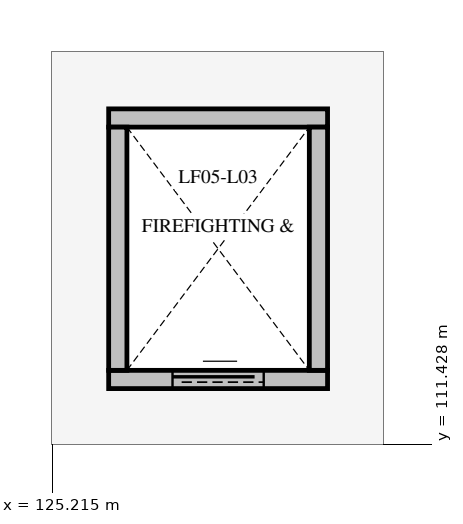
"""IFC4 building model, lengths in metres.
Left out: names, types, materials, properties, quantities, classifications, styles, units other than length and angle.
Written with IfcOpenShell. Run it as: python <this file> out.ifc"""

import sys

from ifc_helpers import new_model, si_unit, direction, frame, frame_2d, origin, place, context, subcontext, project, spatial, rectangle, extrude, element, fill, save


model = new_model("IFC4")
c1 = context("Model", 3, precision=1e-05, world=origin(), true_north=direction((0.0, 1.0)))
c2 = subcontext(c1, "Body", "Model", "MODEL_VIEW")
j1 = project(units=[si_unit("LENGTHUNIT", "METRE"), si_unit("PLANEANGLEUNIT", "RADIAN")], contexts=[c1])
p1 = place(None, origin())
s1 = spatial("IfcSite", under=j1, at=p1, CompositionType="ELEMENT")
p2 = place(p1, origin())
s2 = spatial("IfcBuilding", under=s1, at=p2, CompositionType="ELEMENT")
p3 = place(p2, frame((0.0, 0.0, 14.8)))
s3 = spatial("IfcBuildingStorey", under=s2, at=p3, CompositionType="ELEMENT", Elevation=14.8)
p4 = place(p3, frame((125.96, 112.28, 0.0), z_axis=(0.0, 0.0, 1.0), x_axis=(1.0, 0.0, 0.0)))
e1 = element("IfcWall", 1, at=p4, inside=s3, PredefinedType="SOLIDWALL", context=c2, shape_type="SweptSolid", body=[
    extrude(rectangle(XDim=2.88, YDim=0.24, at=frame_2d((1.44, 0.0))), origin(), (0.0, 0.0, 1.0), 4.2),
])
p5 = place(p4, frame((0.84, 0.0, 0.0)))
e2 = element("IfcOpeningElement", 2, at=p5, cuts=e1, PredefinedType="OPENING", context=c2, shape_type="SweptSolid", body=[
    extrude(rectangle(XDim=1.2, YDim=2.2, at=frame_2d((0.6, 1.1))), frame((0.0, 0.132, 0.0), z_axis=(0.0, -1.0, 0.0), x_axis=(1.0, 0.0, 0.0)), (0.0, 0.0, 1.0), 0.264),
])
p6 = place(p3, frame((125.96, 115.72, 0.0), z_axis=(0.0, 0.0, 1.0), x_axis=(1.0, 0.0, 0.0)))
e3 = element("IfcWall", 3, at=p6, inside=s3, PredefinedType="SOLIDWALL", context=c2, shape_type="SweptSolid", body=[
    extrude(rectangle(XDim=2.88, YDim=0.24, at=frame_2d((1.44, 0.0))), origin(), (0.0, 0.0, 1.0), 4.2),
])
for number, where, z_axis, x_axis in (
    (4, (126.08, 112.4, 0.0), (0.0, 0.0, 1.0), (0.0, 1.0, 0.0)),
    (5, (128.72, 112.4, 0.0), (0.0, 0.0, 1.0), (0.0, 1.0, 0.0)),
):
    element("IfcWall", number, at=place(p3, frame(where, z_axis=z_axis, x_axis=x_axis)), inside=s3, PredefinedType="SOLIDWALL", context=c2, shape_type="SweptSolid", body=[
        extrude(rectangle(XDim=3.2, YDim=0.24, at=frame_2d((1.6, 0.0))), origin(), (0.0, 0.0, 1.0), 4.2),
    ])
p7 = place(p5, origin())
e6 = element("IfcDoor", 6, at=p7, inside=s3, OperationType="SLIDING_TO_RIGHT", PredefinedType="USERDEFINED", context=c2, shape_type="SweptSolid", body=[
    extrude(rectangle(XDim=1.2, YDim=2.2, at=frame_2d((0.6, 1.1))), frame((0.0, 0.025, 0.0), z_axis=(0.0, -1.0, 0.0), x_axis=(1.0, 0.0, 0.0)), (0.0, 0.0, 1.0), 0.05),
])
fill(e2, e6)
save(model, sys.argv[1])
